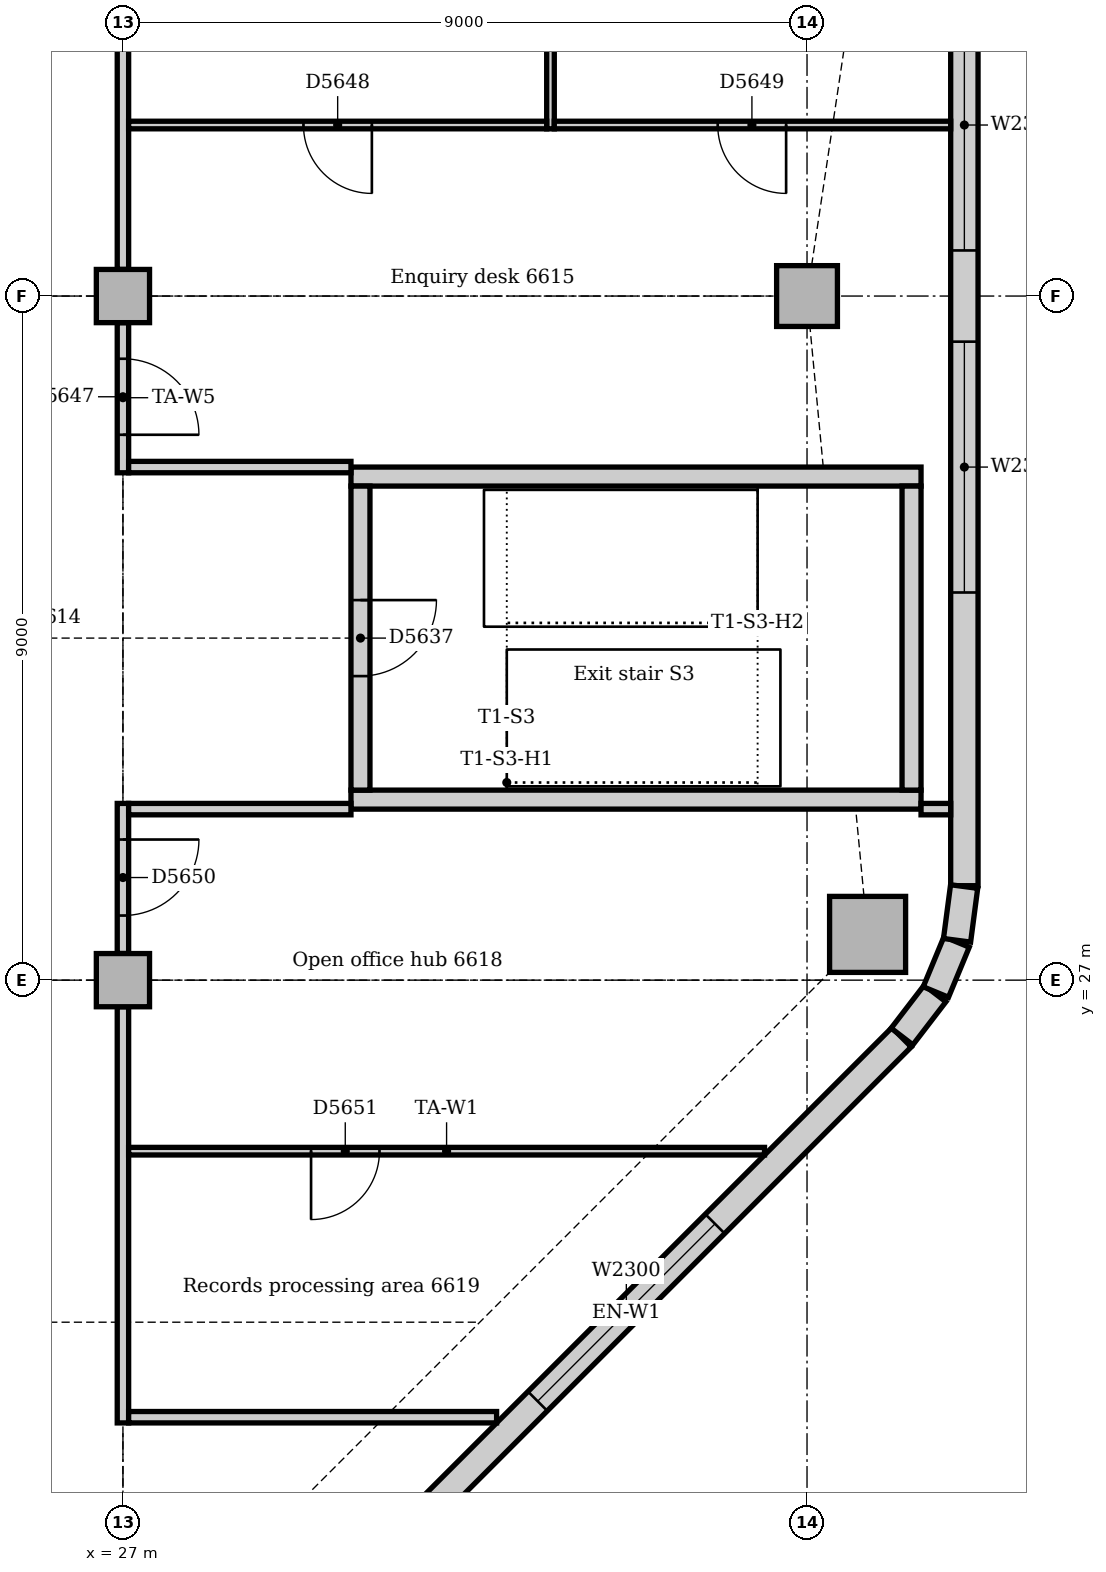
"""IFC4 building model, lengths in metres.
Left out: names, types, materials, properties, quantities, classifications, styles, units other than length and angle.
Written with IfcOpenShell. Run it as: python <this file> out.ifc"""

import sys

from ifc_helpers import new_model, si_unit, direction, frame, frame_2d, origin, origin_2d, place, context, subcontext, project, spatial, rectangle, extrude, element, fill, save


model = new_model("IFC4")
c1 = context("Model", 3, precision=1e-05, world=origin(), true_north=direction((0.0, 1.0)))
c2 = subcontext(c1, "Body", "Model", "MODEL_VIEW")
j1 = project(units=[si_unit("LENGTHUNIT", "METRE"), si_unit("PLANEANGLEUNIT", "RADIAN")], contexts=[c1])
p1 = place(None, origin())
s1 = spatial("IfcSite", under=j1, at=p1, CompositionType="ELEMENT")
p2 = place(p1, origin())
s2 = spatial("IfcBuilding", under=s1, at=p2, CompositionType="ELEMENT")
p3 = place(p2, frame((0.0, 0.0, 275.0)))
s3 = spatial("IfcBuildingStorey", under=s2, at=p3, CompositionType="ELEMENT", Elevation=275.0)
for number, where, z_axis, x_axis in (
    (1, (30.0, 29.375, 0.0), (0.0, 0.0, 1.0), (1.0, 0.0, 0.0)),
    (2, (37.5, 33.625, 0.0), (0.0, 0.0, 1.0), (-1.0, 0.0, 0.0)),
):
    element("IfcWall", number, at=place(p3, frame(where, z_axis=z_axis, x_axis=x_axis)), inside=s3, PredefinedType="SOLIDWALL", context=c2, shape_type="SweptSolid", body=[
        extrude(rectangle(XDim=7.5, YDim=0.25, at=frame_2d((3.75, 0.0))), origin(), (0.0, 0.0, 1.0), 4.0),
    ])
p4 = place(p3, frame((37.375, 29.5, 0.0), z_axis=(0.0, 0.0, 1.0), x_axis=(0.0, 1.0, 0.0)))
e3 = element("IfcWall", 3, at=p4, inside=s3, PredefinedType="SOLIDWALL", context=c2, shape_type="SweptSolid", body=[
    extrude(rectangle(XDim=4.0, YDim=0.25, at=frame_2d((2.0, 0.0))), origin(), (0.0, 0.0, 1.0), 4.0),
])
p5 = place(p3, frame((30.125, 33.5, 0.0), z_axis=(0.0, 0.0, 1.0), x_axis=(0.0, -1.0, 0.0)))
e4 = element("IfcWall", 4, at=p5, inside=s3, PredefinedType="SOLIDWALL", context=c2, shape_type="SweptSolid", body=[
    extrude(rectangle(XDim=4.0, YDim=0.25, at=frame_2d((2.0, 0.0))), origin(), (0.0, 0.0, 1.0), 4.0),
])
p6 = place(p5, frame((1.5, 0.0, 0.0)))
e5 = element("IfcOpeningElement", 5, at=p6, cuts=e4, PredefinedType="OPENING", context=c2, shape_type="SweptSolid", body=[
    extrude(rectangle(XDim=1.0, YDim=2.1, at=frame_2d((0.5, 1.05))), frame((0.0, 0.135, 0.0), z_axis=(0.0, -1.0, 0.0), x_axis=(1.0, 0.0, 0.0)), (0.0, 0.0, 1.0), 0.27),
])
p7 = place(p3, frame((36.797, 27.602, 0.0), z_axis=(0.0, 0.0, 1.0), x_axis=(1.0, 0.0, 0.0)))
e6 = element("IfcColumn", 6, at=p7, inside=s3, PredefinedType="COLUMN", context=c2, shape_type="SweptSolid", body=[
    extrude(rectangle(XDim=1.0, YDim=1.0, at=origin_2d()), origin(), (0.0, 0.0, 1.0), 3.85),
])
p8 = place(p3, frame((36.0, 36.0, 0.0), z_axis=(0.0, 0.0, 1.0), x_axis=(1.0, 0.0, 0.0)))
e7 = element("IfcColumn", 7, at=p8, inside=s3, PredefinedType="COLUMN", context=c2, shape_type="SweptSolid", body=[
    extrude(rectangle(XDim=0.8, YDim=0.8, at=origin_2d()), origin(), (0.0, 0.0, 1.0), 3.85),
])
for number, where, z_axis, x_axis in (
    (8, (27.0, 27.0, 0.0), (0.0, 0.0, 1.0), (1.0, 0.0, 0.0)),
    (9, (27.0, 36.0, 0.0), (0.0, 0.0, 1.0), (1.0, 0.0, 0.0)),
):
    element("IfcColumn", number, at=place(p3, frame(where, z_axis=z_axis, x_axis=x_axis)), inside=s3, PredefinedType="COLUMN", context=c2, shape_type="SweptSolid", body=[
        extrude(rectangle(XDim=0.7, YDim=0.7, at=origin_2d()), origin(), (0.0, 0.0, 1.0), 3.85),
    ])
p9 = place(p3, frame((30.001, 19.006, 0.0), z_axis=(0.0, 0.0, 1.0), x_axis=(0.707106781187, 0.707106781187, 0.0)))
e10 = element("IfcWall", 10, at=p9, inside=s3, PredefinedType="STANDARD", context=c2, shape_type="SweptSolid", body=[
    extrude(rectangle(XDim=10.243, YDim=0.36, at=frame_2d((5.121, 0.0))), origin(), (0.0, 0.0, 1.0), 3.85),
])
p10 = place(p9, frame((3.471, 0.0, 0.9)))
e11 = element("IfcOpeningElement", 11, at=p10, cuts=e10, PredefinedType="OPENING", context=c2, shape_type="SweptSolid", body=[
    extrude(rectangle(XDim=3.3, YDim=1.6, at=frame_2d((1.65, 0.8))), frame((0.0, 0.19, 0.0), z_axis=(0.0, -1.0, 0.0), x_axis=(1.0, 0.0, 0.0)), (0.0, 0.0, 1.0), 0.38),
])
p11 = place(p3, frame((38.07, 28.243, 0.0), z_axis=(0.0, 0.0, 1.0), x_axis=(0.0, 1.0, 0.0)))
e12 = element("IfcWall", 12, at=p11, inside=s3, PredefinedType="STANDARD", context=c2, shape_type="SweptSolid", body=[
    extrude(rectangle(XDim=24.515, YDim=0.36, at=frame_2d((12.257, 0.0))), origin(), (0.0, 0.0, 1.0), 3.85),
])
p12 = place(p11, frame((3.857, 0.0, 0.9)))
e13 = element("IfcOpeningElement", 13, at=p12, cuts=e12, PredefinedType="OPENING", context=c2, shape_type="SweptSolid", body=[
    extrude(rectangle(XDim=3.3, YDim=1.6, at=frame_2d((1.65, 0.8))), frame((0.0, 0.19, 0.0), z_axis=(0.0, -1.0, 0.0), x_axis=(1.0, 0.0, 0.0)), (0.0, 0.0, 1.0), 0.38),
])
p13 = place(p11, frame((8.357, 0.0, 0.9)))
e14 = element("IfcOpeningElement", 14, at=p13, cuts=e12, PredefinedType="OPENING", context=c2, shape_type="SweptSolid", body=[
    extrude(rectangle(XDim=3.3, YDim=1.6, at=frame_2d((1.65, 0.8))), frame((0.0, 0.19, 0.0), z_axis=(0.0, -1.0, 0.0), x_axis=(1.0, 0.0, 0.0)), (0.0, 0.0, 1.0), 0.38),
])
p14 = place(p11, frame((12.857, 0.0, 0.9)))
e15 = element("IfcOpeningElement", 15, at=p14, cuts=e12, PredefinedType="OPENING", context=c2, shape_type="SweptSolid", body=[
    extrude(rectangle(XDim=3.3, YDim=1.6, at=frame_2d((1.65, 0.8))), frame((0.0, 0.19, 0.0), z_axis=(0.0, -1.0, 0.0), x_axis=(1.0, 0.0, 0.0)), (0.0, 0.0, 1.0), 0.38),
])
p15 = place(p11, frame((17.357, 0.0, 0.9)))
e16 = element("IfcOpeningElement", 16, at=p15, cuts=e12, PredefinedType="OPENING", context=c2, shape_type="SweptSolid", body=[
    extrude(rectangle(XDim=3.3, YDim=1.6, at=frame_2d((1.65, 0.8))), frame((0.0, 0.19, 0.0), z_axis=(0.0, -1.0, 0.0), x_axis=(1.0, 0.0, 0.0)), (0.0, 0.0, 1.0), 0.38),
])
p16 = place(p3, frame((37.25, 26.259, 0.0), z_axis=(0.0, 0.0, 1.0), x_axis=(0.608802368033, 0.793321924995, 0.0)))
e17 = element("IfcWall", 17, at=p16, inside=s3, PredefinedType="STANDARD", context=c2, shape_type="SweptSolid", body=[
    extrude(rectangle(XDim=0.713, YDim=0.36, at=frame_2d((0.357, 0.0))), origin(), (0.0, 0.0, 1.0), 3.85),
])
for number, where, z_axis, x_axis in (
    (18, (37.695, 26.844, 0.0), (0.0, 0.0, 1.0), (0.383, 0.924, 0.0)),
    (19, (37.974, 27.524, 0.0), (0.0, 0.0, 1.0), (0.131, 0.991, 0.0)),
):
    element("IfcWall", number, at=place(p3, frame(where, z_axis=z_axis, x_axis=x_axis)), inside=s3, PredefinedType="STANDARD", context=c2, shape_type="SweptSolid", body=[
        extrude(rectangle(XDim=0.713, YDim=0.36, at=frame_2d((0.356, 0.0))), origin(), (0.0, 0.0, 1.0), 3.85),
    ])
p17 = place(p3, frame((27.0, 33.675, 0.0), z_axis=(0.0, 0.0, 1.0), x_axis=(0.0, 1.0, 0.0)))
e20 = element("IfcWall", 20, at=p17, inside=s3, PredefinedType="PARTITIONING", context=c2, shape_type="SweptSolid", body=[
    extrude(rectangle(XDim=1.975, YDim=0.15, at=frame_2d((0.988, 0.0))), origin(), (0.0, 0.0, 1.0), 3.4),
])
p18 = place(p17, frame((0.5, 0.0, 0.0)))
e21 = element("IfcOpeningElement", 21, at=p18, cuts=e20, PredefinedType="OPENING", context=c2, shape_type="SweptSolid", body=[
    extrude(rectangle(XDim=1.0, YDim=2.1, at=frame_2d((0.5, 1.05))), frame((0.0, 0.085, 0.0), z_axis=(0.0, -1.0, 0.0), x_axis=(1.0, 0.0, 0.0)), (0.0, 0.0, 1.0), 0.17),
])
p19 = place(p3, frame((27.0, 36.35, 0.0), z_axis=(0.0, 0.0, 1.0), x_axis=(0.0, 1.0, 0.0)))
e22 = element("IfcWall", 22, at=p19, inside=s3, PredefinedType="PARTITIONING", context=c2, shape_type="SweptSolid", body=[
    extrude(rectangle(XDim=7.4, YDim=0.15, at=frame_2d((3.7, 0.0))), origin(), (0.0, 0.0, 1.0), 3.4),
])
p20 = place(p3, frame((27.0, 21.175, 0.0), z_axis=(0.0, 0.0, 1.0), x_axis=(0.0, 1.0, 0.0)))
e23 = element("IfcWall", 23, at=p20, inside=s3, PredefinedType="PARTITIONING", context=c2, shape_type="SweptSolid", body=[
    extrude(rectangle(XDim=5.475, YDim=0.15, at=frame_2d((2.737, 0.0))), origin(), (0.0, 0.0, 1.0), 3.4),
])
p21 = place(p3, frame((27.0, 27.35, 0.0), z_axis=(0.0, 0.0, 1.0), x_axis=(0.0, 1.0, 0.0)))
e24 = element("IfcWall", 24, at=p21, inside=s3, PredefinedType="PARTITIONING", context=c2, shape_type="SweptSolid", body=[
    extrude(rectangle(XDim=1.975, YDim=0.15, at=frame_2d((0.988, 0.0))), origin(), (0.0, 0.0, 1.0), 3.4),
])
p22 = place(p21, frame((0.5, 0.0, 0.0)))
e25 = element("IfcOpeningElement", 25, at=p22, cuts=e24, PredefinedType="OPENING", context=c2, shape_type="SweptSolid", body=[
    extrude(rectangle(XDim=1.0, YDim=2.1, at=frame_2d((0.5, 1.05))), frame((0.0, 0.085, 0.0), z_axis=(0.0, -1.0, 0.0), x_axis=(1.0, 0.0, 0.0)), (0.0, 0.0, 1.0), 0.17),
])
p23 = place(p3, frame((27.075, 21.25, 0.0), z_axis=(0.0, 0.0, 1.0), x_axis=(1.0, 0.0, 0.0)))
e26 = element("IfcWall", 26, at=p23, inside=s3, PredefinedType="PARTITIONING", context=c2, shape_type="SweptSolid", body=[
    extrude(rectangle(XDim=4.841, YDim=0.15, at=frame_2d((2.421, 0.0))), origin(), (0.0, 0.0, 1.0), 3.85),
])
for number, where, z_axis, x_axis in (
    (27, (27.075, 29.25, 0.0), (0.0, 0.0, 1.0), (1.0, 0.0, 0.0)),
    (28, (27.075, 33.75, 0.0), (0.0, 0.0, 1.0), (1.0, 0.0, 0.0)),
):
    element("IfcWall", number, at=place(p3, frame(where, z_axis=z_axis, x_axis=x_axis)), inside=s3, PredefinedType="PARTITIONING", context=c2, shape_type="SweptSolid", body=[
        extrude(rectangle(XDim=2.925, YDim=0.15, at=frame_2d((1.462, 0.0))), origin(), (0.0, 0.0, 1.0), 3.85),
    ])
p24 = place(p3, frame((37.5, 29.25, 0.0), z_axis=(0.0, 0.0, 1.0), x_axis=(1.0, 0.0, 0.0)))
e29 = element("IfcWall", 29, at=p24, inside=s3, PredefinedType="PARTITIONING", context=c2, shape_type="SweptSolid", body=[
    extrude(rectangle(XDim=0.39, YDim=0.15, at=frame_2d((0.195, 0.0))), origin(), (0.0, 0.0, 1.0), 3.85),
])
p25 = place(p3, frame((32.625, 38.2, 0.0), z_axis=(0.0, 0.0, 1.0), x_axis=(0.0, 1.0, 0.0)))
e30 = element("IfcWall", 30, at=p25, inside=s3, PredefinedType="PARTITIONING", context=c2, shape_type="SweptSolid", body=[
    extrude(rectangle(XDim=20.966, YDim=0.1, at=frame_2d((10.483, 0.0))), origin(), (0.0, 0.0, 1.0), 3.85),
])
p26 = place(p3, frame((27.075, 38.25, 0.0), z_axis=(0.0, 0.0, 1.0), x_axis=(1.0, 0.0, 0.0)))
e31 = element("IfcWall", 31, at=p26, inside=s3, PredefinedType="PARTITIONING", context=c2, shape_type="SweptSolid", body=[
    extrude(rectangle(XDim=5.5, YDim=0.1, at=frame_2d((2.75, 0.0))), origin(), (0.0, 0.0, 1.0), 3.85),
])
p27 = place(p26, frame((2.3, 0.0, 0.0)))
e32 = element("IfcOpeningElement", 32, at=p27, cuts=e31, PredefinedType="OPENING", context=c2, shape_type="SweptSolid", body=[
    extrude(rectangle(XDim=0.9, YDim=2.1, at=frame_2d((0.45, 1.05))), frame((0.0, 0.06, 0.0), z_axis=(0.0, -1.0, 0.0), x_axis=(1.0, 0.0, 0.0)), (0.0, 0.0, 1.0), 0.12),
])
p28 = place(p3, frame((32.675, 38.25, 0.0), z_axis=(0.0, 0.0, 1.0), x_axis=(1.0, 0.0, 0.0)))
e33 = element("IfcWall", 33, at=p28, inside=s3, PredefinedType="PARTITIONING", context=c2, shape_type="SweptSolid", body=[
    extrude(rectangle(XDim=5.215, YDim=0.1, at=frame_2d((2.607, 0.0))), origin(), (0.0, 0.0, 1.0), 3.85),
])
p29 = place(p28, frame((2.15, 0.0, 0.0)))
e34 = element("IfcOpeningElement", 34, at=p29, cuts=e33, PredefinedType="OPENING", context=c2, shape_type="SweptSolid", body=[
    extrude(rectangle(XDim=0.9, YDim=2.1, at=frame_2d((0.45, 1.05))), frame((0.0, 0.06, 0.0), z_axis=(0.0, -1.0, 0.0), x_axis=(1.0, 0.0, 0.0)), (0.0, 0.0, 1.0), 0.12),
])
p30 = place(p3, frame((27.075, 24.75, 0.0), z_axis=(0.0, 0.0, 1.0), x_axis=(1.0, 0.0, 0.0)))
e35 = element("IfcWall", 35, at=p30, inside=s3, PredefinedType="PARTITIONING", context=c2, shape_type="SweptSolid", body=[
    extrude(rectangle(XDim=8.366, YDim=0.1, at=frame_2d((4.183, 0.0))), origin(), (0.0, 0.0, 1.0), 3.85),
])
p31 = place(p30, frame((2.4, 0.0, 0.0)))
e36 = element("IfcOpeningElement", 36, at=p31, cuts=e35, PredefinedType="OPENING", context=c2, shape_type="SweptSolid", body=[
    extrude(rectangle(XDim=0.9, YDim=2.1, at=frame_2d((0.45, 1.05))), frame((0.0, 0.06, 0.0), z_axis=(0.0, -1.0, 0.0), x_axis=(1.0, 0.0, 0.0)), (0.0, 0.0, 1.0), 0.12),
])
p32 = place(p10, origin())
e37 = element("IfcWindow", 37, at=p32, inside=s3, PartitioningType="SINGLE_PANEL", PredefinedType="WINDOW", context=c2, shape_type="SweptSolid", body=[
    extrude(rectangle(XDim=3.3, YDim=1.6, at=frame_2d((1.65, 0.8))), frame((0.0, 0.13, 0.0), z_axis=(0.0, -1.0, 0.0), x_axis=(1.0, 0.0, 0.0)), (0.0, 0.0, 1.0), 0.06),
])
fill(e11, e37)
p33 = place(p12, origin())
e38 = element("IfcWindow", 38, at=p33, inside=s3, PartitioningType="SINGLE_PANEL", PredefinedType="WINDOW", context=c2, shape_type="SweptSolid", body=[
    extrude(rectangle(XDim=3.3, YDim=1.6, at=frame_2d((1.65, 0.8))), frame((0.0, 0.13, 0.0), z_axis=(0.0, -1.0, 0.0), x_axis=(1.0, 0.0, 0.0)), (0.0, 0.0, 1.0), 0.06),
])
fill(e13, e38)
p34 = place(p13, origin())
e39 = element("IfcWindow", 39, at=p34, inside=s3, PartitioningType="SINGLE_PANEL", PredefinedType="WINDOW", context=c2, shape_type="SweptSolid", body=[
    extrude(rectangle(XDim=3.3, YDim=1.6, at=frame_2d((1.65, 0.8))), frame((0.0, 0.13, 0.0), z_axis=(0.0, -1.0, 0.0), x_axis=(1.0, 0.0, 0.0)), (0.0, 0.0, 1.0), 0.06),
])
fill(e14, e39)
p35 = place(p6, origin())
e40 = element("IfcDoor", 40, at=p35, inside=s3, OperationType="SINGLE_SWING_LEFT", PredefinedType="DOOR", context=c2, shape_type="SweptSolid", body=[
    extrude(rectangle(XDim=1.0, YDim=2.1, at=frame_2d((0.5, 1.05))), frame((0.0, 0.025, 0.0), z_axis=(0.0, -1.0, 0.0), x_axis=(1.0, 0.0, 0.0)), (0.0, 0.0, 1.0), 0.05),
])
fill(e5, e40)
p36 = place(p18, frame((1.0, 0.0, 0.0), z_axis=(0.0, 0.0, 1.0), x_axis=(-1.0, 0.0, 0.0)))
e41 = element("IfcDoor", 41, at=p36, inside=s3, OperationType="SINGLE_SWING_RIGHT", PredefinedType="DOOR", context=c2, shape_type="SweptSolid", body=[
    extrude(rectangle(XDim=1.0, YDim=2.1, at=frame_2d((0.5, 1.05))), frame((0.0, 0.025, 0.0), z_axis=(0.0, -1.0, 0.0), x_axis=(1.0, 0.0, 0.0)), (0.0, 0.0, 1.0), 0.05),
])
fill(e21, e41)
p37 = place(p27, frame((0.9, 0.0, 0.0), z_axis=(0.0, 0.0, 1.0), x_axis=(-1.0, 0.0, 0.0)))
e42 = element("IfcDoor", 42, at=p37, inside=s3, OperationType="SINGLE_SWING_LEFT", PredefinedType="DOOR", context=c2, shape_type="SweptSolid", body=[
    extrude(rectangle(XDim=0.9, YDim=2.1, at=frame_2d((0.45, 1.05))), frame((0.0, 0.025, 0.0), z_axis=(0.0, -1.0, 0.0), x_axis=(1.0, 0.0, 0.0)), (0.0, 0.0, 1.0), 0.05),
])
fill(e32, e42)
p38 = place(p29, frame((0.9, 0.0, 0.0), z_axis=(0.0, 0.0, 1.0), x_axis=(-1.0, 0.0, 0.0)))
e43 = element("IfcDoor", 43, at=p38, inside=s3, OperationType="SINGLE_SWING_LEFT", PredefinedType="DOOR", context=c2, shape_type="SweptSolid", body=[
    extrude(rectangle(XDim=0.9, YDim=2.1, at=frame_2d((0.45, 1.05))), frame((0.0, 0.025, 0.0), z_axis=(0.0, -1.0, 0.0), x_axis=(1.0, 0.0, 0.0)), (0.0, 0.0, 1.0), 0.05),
])
fill(e34, e43)
p39 = place(p22, frame((1.0, 0.0, 0.0), z_axis=(0.0, 0.0, 1.0), x_axis=(-1.0, 0.0, 0.0)))
e44 = element("IfcDoor", 44, at=p39, inside=s3, OperationType="SINGLE_SWING_LEFT", PredefinedType="DOOR", context=c2, shape_type="SweptSolid", body=[
    extrude(rectangle(XDim=1.0, YDim=2.1, at=frame_2d((0.5, 1.05))), frame((0.0, 0.025, 0.0), z_axis=(0.0, -1.0, 0.0), x_axis=(1.0, 0.0, 0.0)), (0.0, 0.0, 1.0), 0.05),
])
fill(e25, e44)
p40 = place(p31, frame((0.9, 0.0, 0.0), z_axis=(0.0, 0.0, 1.0), x_axis=(-1.0, 0.0, 0.0)))
e45 = element("IfcDoor", 45, at=p40, inside=s3, OperationType="SINGLE_SWING_RIGHT", PredefinedType="DOOR", context=c2, shape_type="SweptSolid", body=[
    extrude(rectangle(XDim=0.9, YDim=2.1, at=frame_2d((0.45, 1.05))), frame((0.0, 0.025, 0.0), z_axis=(0.0, -1.0, 0.0), x_axis=(1.0, 0.0, 0.0)), (0.0, 0.0, 1.0), 0.05),
])
fill(e36, e45)
save(model, sys.argv[1])
